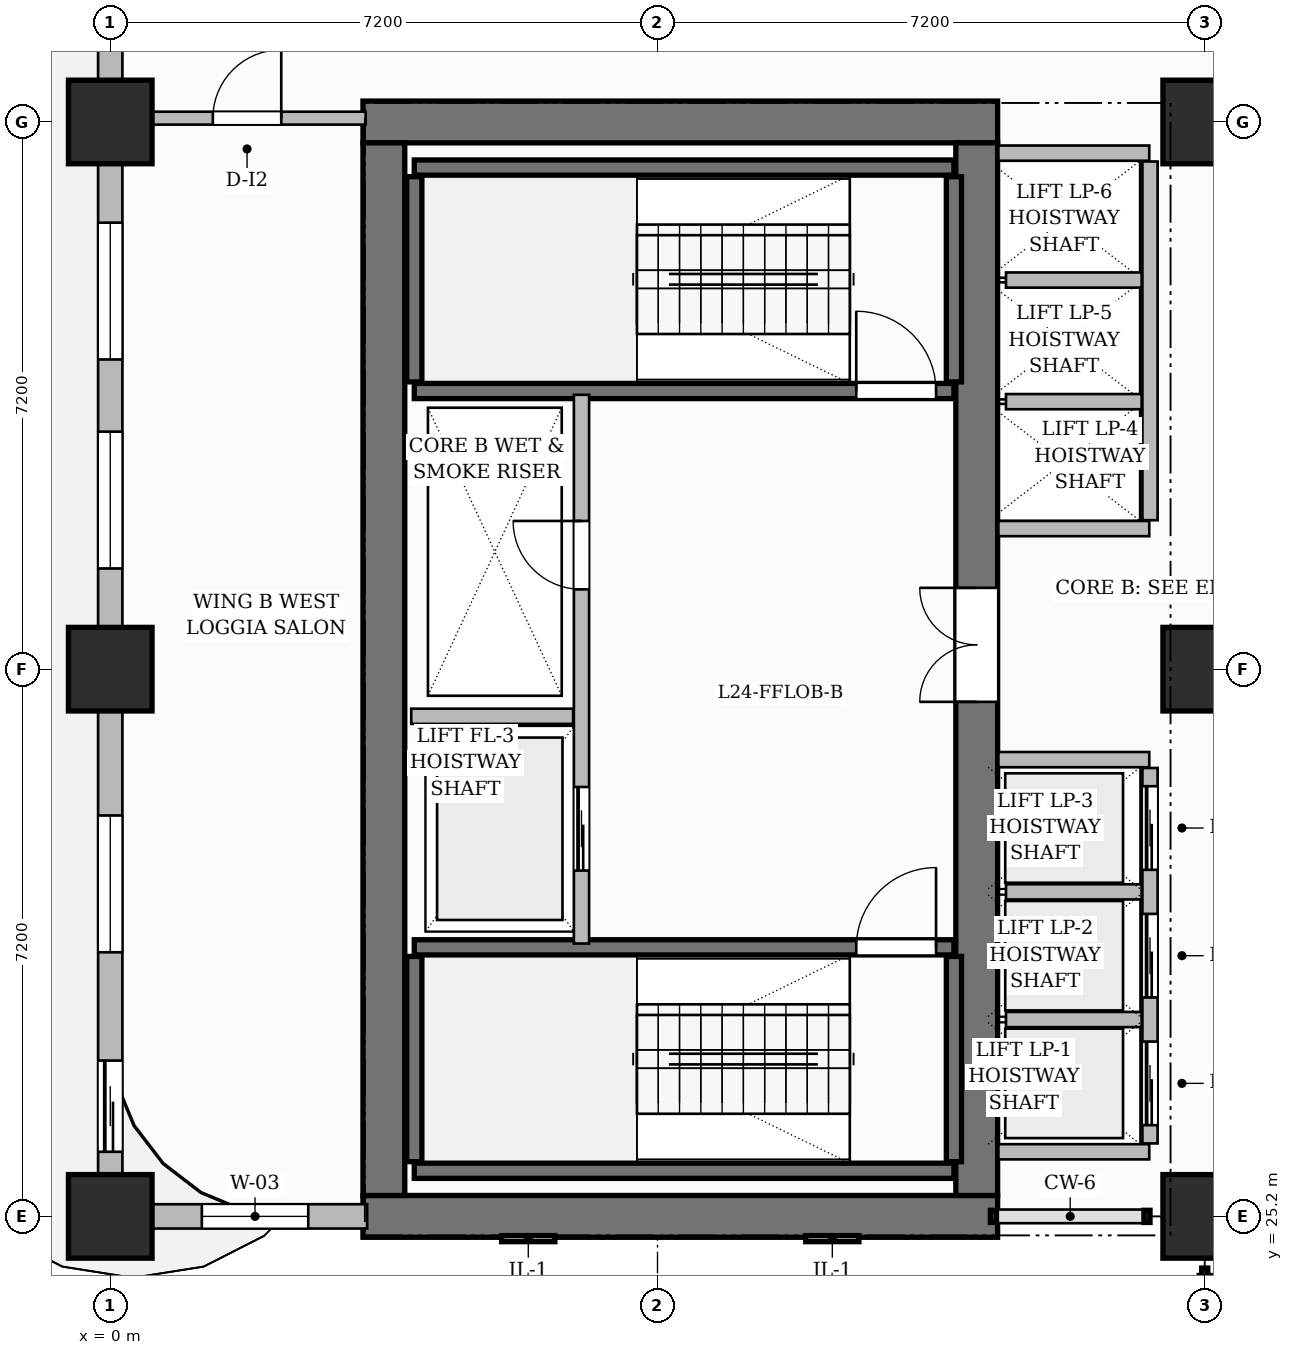
"""IFC4 building model, lengths in metres.
Left out: names, types, materials, properties, quantities, classifications, styles, units other than length and angle.
Written with IfcOpenShell. Run it as: python <this file> out.ifc"""

import sys

from ifc_helpers import new_model, si_unit, direction, frame, frame_2d, origin, origin_2d, place, context, subcontext, project, spatial, rectangle, extrude, source, transform, mapped, element, fill, save


model = new_model("IFC4")
c1 = context("Model", 3, precision=1e-05, world=origin(), true_north=direction((0.0, 1.0)))
c2 = subcontext(c1, "Body", "Model", "MODEL_VIEW")
j1 = project(units=[si_unit("LENGTHUNIT", "METRE"), si_unit("PLANEANGLEUNIT", "RADIAN")], contexts=[c1])
p1 = place(None, origin())
s1 = spatial("IfcSite", under=j1, at=p1, CompositionType="ELEMENT")
p2 = place(p1, origin())
s2 = spatial("IfcBuilding", under=s1, at=p2, CompositionType="ELEMENT")
p3 = place(p2, frame((0.0, 0.0, 99.0)))
s3 = spatial("IfcBuildingStorey", under=s2, at=p3, CompositionType="ELEMENT", Elevation=99.0)
for number, where, z_axis, x_axis in (
    (1, (3.325, 25.2, 0.0), (0.0, 0.0, 1.0), (1.0, 0.0, 0.0)),
    (2, (3.325, 39.6, 0.0), (0.0, 0.0, 1.0), (1.0, 0.0, 0.0)),
):
    element("IfcWall", number, at=place(p3, frame(where, z_axis=z_axis, x_axis=x_axis)), inside=s3, PredefinedType="SHEAR", context=c2, shape_type="SweptSolid", body=[
        extrude(rectangle(XDim=8.35, YDim=0.55, at=frame_2d((4.175, 0.0))), origin(), (0.0, 0.0, 1.0), 3.7),
    ])
p4 = place(p3, frame((3.6, 25.475, 0.0), z_axis=(0.0, 0.0, 1.0), x_axis=(0.0, 1.0, 0.0)))
e3 = element("IfcWall", 3, at=p4, inside=s3, PredefinedType="SHEAR", context=c2, shape_type="SweptSolid", body=[
    extrude(rectangle(XDim=13.85, YDim=0.55, at=frame_2d((6.925, 0.0))), origin(), (0.0, 0.0, 1.0), 3.7),
])
p5 = place(p3, frame((11.4, 25.475, 0.0), z_axis=(0.0, 0.0, 1.0), x_axis=(0.0, 1.0, 0.0)))
e4 = element("IfcWall", 4, at=p5, inside=s3, PredefinedType="SHEAR", context=c2, shape_type="SweptSolid", body=[
    extrude(rectangle(XDim=13.85, YDim=0.55, at=frame_2d((6.925, 0.0))), origin(), (0.0, 0.0, 1.0), 3.7),
])
p6 = place(p5, frame((6.495, 0.0, 0.0)))
e5 = element("IfcOpeningElement", 5, at=p6, cuts=e4, PredefinedType="OPENING", context=c2, shape_type="SweptSolid", body=[
    extrude(rectangle(XDim=1.5, YDim=2.2, at=frame_2d((0.75, 1.1))), frame((0.0, 0.285, 0.0), z_axis=(0.0, -1.0, 0.0), x_axis=(1.0, 0.0, 0.0)), (0.0, 0.0, 1.0), 0.57),
])
m1 = source(origin(), c2, "Body", "SweptSolid", [
    extrude(rectangle(XDim=1.1, YDim=1.1, at=origin_2d()), origin(), (0.0, 0.0, 1.0), 3.7),
])
for number, where, z_axis, x_axis in (
    (6, (0.0, 25.2, 0.0), (0.0, 0.0, 1.0), (1.0, 0.0, 0.0)),
    (7, (0.0, 32.4, 0.0), (0.0, 0.0, 1.0), (1.0, 0.0, 0.0)),
    (8, (0.0, 39.6, 0.0), (0.0, 0.0, 1.0), (1.0, 0.0, 0.0)),
    (9, (14.4, 25.2, 0.0), (0.0, 0.0, 1.0), (1.0, 0.0, 0.0)),
    (10, (14.4, 32.4, 0.0), (0.0, 0.0, 1.0), (1.0, 0.0, 0.0)),
    (11, (14.4, 39.6, 0.0), (0.0, 0.0, 1.0), (1.0, 0.0, 0.0)),
):
    element("IfcColumn", number, at=place(p3, frame(where, z_axis=z_axis, x_axis=x_axis)), inside=s3, PredefinedType="COLUMN", context=c2, shape_type="MappedRepresentation", body=[
        mapped(m1, transform((0.0, 0.0, 0.0), scale=1.0)),
    ])
p7 = place(p3, frame((4.0, 25.8, 0.0), z_axis=(0.0, 0.0, 1.0), x_axis=(1.0, 0.0, 0.0)))
e12 = element("IfcWall", 12, at=p7, inside=s3, PredefinedType="SHEAR", context=c2, shape_type="SweptSolid", body=[
    extrude(rectangle(XDim=7.1, YDim=0.2, at=frame_2d((3.55, 0.0))), origin(), (0.0, 0.0, 1.0), 3.7),
])
for number, where, z_axis, x_axis in (
    (13, (4.0, 25.92, 0.0), (0.0, 0.0, 1.0), (0.0, 1.0, 0.0)),
    (14, (11.1, 25.92, 0.0), (0.0, 0.0, 1.0), (0.0, 1.0, 0.0)),
):
    element("IfcWall", number, at=place(p3, frame(where, z_axis=z_axis, x_axis=x_axis)), inside=s3, PredefinedType="SHEAR", context=c2, shape_type="SweptSolid", body=[
        extrude(rectangle(XDim=2.7, YDim=0.2, at=frame_2d((1.35, 0.0))), origin(), (0.0, 0.0, 1.0), 3.7),
    ])
p8 = place(p3, frame((4.0, 28.74, 0.0), z_axis=(0.0, 0.0, 1.0), x_axis=(1.0, 0.0, 0.0)))
e15 = element("IfcWall", 15, at=p8, inside=s3, PredefinedType="SHEAR", context=c2, shape_type="SweptSolid", body=[
    extrude(rectangle(XDim=7.1, YDim=0.2, at=frame_2d((3.55, 0.0))), origin(), (0.0, 0.0, 1.0), 3.7),
])
p9 = place(p8, frame((5.815, 0.0, 0.0)))
e16 = element("IfcOpeningElement", 16, at=p9, cuts=e15, PredefinedType="OPENING", context=c2, shape_type="SweptSolid", body=[
    extrude(rectangle(XDim=1.05, YDim=2.2, at=frame_2d((0.525, 1.1))), frame((0.0, 0.11, 0.0), z_axis=(0.0, -1.0, 0.0), x_axis=(1.0, 0.0, 0.0)), (0.0, 0.0, 1.0), 0.22),
])
p10 = place(p3, frame((4.0, 39.0, 0.0), z_axis=(0.0, 0.0, 1.0), x_axis=(1.0, 0.0, 0.0)))
e17 = element("IfcWall", 17, at=p10, inside=s3, PredefinedType="SHEAR", context=c2, shape_type="SweptSolid", body=[
    extrude(rectangle(XDim=7.1, YDim=0.2, at=frame_2d((3.55, 0.0))), origin(), (0.0, 0.0, 1.0), 3.7),
])
for number, where, z_axis, x_axis in (
    (18, (4.0, 36.18, 0.0), (0.0, 0.0, 1.0), (0.0, 1.0, 0.0)),
    (19, (11.1, 36.18, 0.0), (0.0, 0.0, 1.0), (0.0, 1.0, 0.0)),
):
    element("IfcWall", number, at=place(p3, frame(where, z_axis=z_axis, x_axis=x_axis)), inside=s3, PredefinedType="SHEAR", context=c2, shape_type="SweptSolid", body=[
        extrude(rectangle(XDim=2.7, YDim=0.2, at=frame_2d((1.35, 0.0))), origin(), (0.0, 0.0, 1.0), 3.7),
    ])
p11 = place(p3, frame((4.0, 36.06, 0.0), z_axis=(0.0, 0.0, 1.0), x_axis=(1.0, 0.0, 0.0)))
e20 = element("IfcWall", 20, at=p11, inside=s3, PredefinedType="SHEAR", context=c2, shape_type="SweptSolid", body=[
    extrude(rectangle(XDim=7.1, YDim=0.2, at=frame_2d((3.55, 0.0))), origin(), (0.0, 0.0, 1.0), 3.7),
])
p12 = place(p11, frame((5.815, 0.0, 0.0)))
e21 = element("IfcOpeningElement", 21, at=p12, cuts=e20, PredefinedType="OPENING", context=c2, shape_type="SweptSolid", body=[
    extrude(rectangle(XDim=1.05, YDim=2.2, at=frame_2d((0.525, 1.1))), frame((0.0, 0.11, 0.0), z_axis=(0.0, -1.0, 0.0), x_axis=(1.0, 0.0, 0.0)), (0.0, 0.0, 1.0), 0.22),
])
p13 = place(p3, frame((6.2, 28.79, 0.0), z_axis=(0.0, 0.0, 1.0), x_axis=(0.0, 1.0, 0.0)))
e22 = element("IfcWall", 22, at=p13, inside=s3, PredefinedType="PARTITIONING", context=c2, shape_type="SweptSolid", body=[
    extrude(rectangle(XDim=7.22, YDim=0.2, at=frame_2d((3.61, 0.0))), origin(), (0.0, 0.0, 1.0), 3.45),
])
p14 = place(p13, frame((4.66, 0.0, 0.0)))
e23 = element("IfcOpeningElement", 23, at=p14, cuts=e22, PredefinedType="OPENING", context=c2, shape_type="SweptSolid", body=[
    extrude(rectangle(XDim=0.9, YDim=2.1, at=frame_2d((0.45, 1.05))), frame((0.0, 0.11, 0.0), z_axis=(0.0, -1.0, 0.0), x_axis=(1.0, 0.0, 0.0)), (0.0, 0.0, 1.0), 0.22),
])
p15 = place(p13, frame((0.96, 0.0, 0.0)))
e24 = element("IfcOpeningElement", 24, at=p15, cuts=e22, PredefinedType="OPENING", context=c2, shape_type="SweptSolid", body=[
    extrude(rectangle(XDim=1.1, YDim=2.2, at=frame_2d((0.55, 1.1))), frame((0.0, 0.11, 0.0), z_axis=(0.0, -1.0, 0.0), x_axis=(1.0, 0.0, 0.0)), (0.0, 0.0, 1.0), 0.22),
])
p16 = place(p3, frame((3.96, 31.78, 0.0), z_axis=(0.0, 0.0, 1.0), x_axis=(1.0, 0.0, 0.0)))
e25 = element("IfcWall", 25, at=p16, inside=s3, PredefinedType="PARTITIONING", context=c2, shape_type="SweptSolid", body=[
    extrude(rectangle(XDim=2.13, YDim=0.2, at=frame_2d((1.065, 0.0))), origin(), (0.0, 0.0, 1.0), 3.45),
])
for number, where, z_axis, x_axis in (
    (26, (11.685, 26.05, 0.0), (0.0, 0.0, 1.0), (1.0, 0.0, 0.0)),
    (27, (11.685, 31.21, 0.0), (0.0, 0.0, 1.0), (1.0, 0.0, 0.0)),
):
    element("IfcWall", number, at=place(p3, frame(where, z_axis=z_axis, x_axis=x_axis)), inside=s3, PredefinedType="PARTITIONING", context=c2, shape_type="SweptSolid", body=[
        extrude(rectangle(XDim=1.985, YDim=0.2, at=frame_2d((0.992, 0.0))), origin(), (0.0, 0.0, 1.0), 3.45),
    ])
p17 = place(p3, frame((13.68, 26.16, 0.0), z_axis=(0.0, 0.0, 1.0), x_axis=(0.0, 1.0, 0.0)))
e28 = element("IfcWall", 28, at=p17, inside=s3, PredefinedType="PARTITIONING", context=c2, shape_type="SweptSolid", body=[
    extrude(rectangle(XDim=4.94, YDim=0.2, at=frame_2d((2.47, 0.0))), origin(), (0.0, 0.0, 1.0), 3.45),
])
p18 = place(p17, frame((0.24, 0.0, 0.0)))
e29 = element("IfcOpeningElement", 29, at=p18, cuts=e28, PredefinedType="OPENING", context=c2, shape_type="SweptSolid", body=[
    extrude(rectangle(XDim=1.1, YDim=2.2, at=frame_2d((0.55, 1.1))), frame((0.0, 0.11, 0.0), z_axis=(0.0, -1.0, 0.0), x_axis=(1.0, 0.0, 0.0)), (0.0, 0.0, 1.0), 0.22),
])
p19 = place(p17, frame((1.92, 0.0, 0.0)))
e30 = element("IfcOpeningElement", 30, at=p19, cuts=e28, PredefinedType="OPENING", context=c2, shape_type="SweptSolid", body=[
    extrude(rectangle(XDim=1.1, YDim=2.2, at=frame_2d((0.55, 1.1))), frame((0.0, 0.11, 0.0), z_axis=(0.0, -1.0, 0.0), x_axis=(1.0, 0.0, 0.0)), (0.0, 0.0, 1.0), 0.22),
])
p20 = place(p17, frame((3.6, 0.0, 0.0)))
e31 = element("IfcOpeningElement", 31, at=p20, cuts=e28, PredefinedType="OPENING", context=c2, shape_type="SweptSolid", body=[
    extrude(rectangle(XDim=1.1, YDim=2.2, at=frame_2d((0.55, 1.1))), frame((0.0, 0.11, 0.0), z_axis=(0.0, -1.0, 0.0), x_axis=(1.0, 0.0, 0.0)), (0.0, 0.0, 1.0), 0.22),
])
for number, where, z_axis, x_axis in (
    (32, (11.785, 27.79, 0.0), (0.0, 0.0, 1.0), (1.0, 0.0, 0.0)),
    (33, (11.785, 29.47, 0.0), (0.0, 0.0, 1.0), (1.0, 0.0, 0.0)),
):
    element("IfcWall", number, at=place(p3, frame(where, z_axis=z_axis, x_axis=x_axis)), inside=s3, PredefinedType="PARTITIONING", context=c2, shape_type="SweptSolid", body=[
        extrude(rectangle(XDim=1.785, YDim=0.2, at=frame_2d((0.893, 0.0))), origin(), (0.0, 0.0, 1.0), 3.45),
    ])
for number, where, z_axis, x_axis in (
    (34, (11.685, 34.25, 0.0), (0.0, 0.0, 1.0), (1.0, 0.0, 0.0)),
    (35, (11.685, 39.19, 0.0), (0.0, 0.0, 1.0), (1.0, 0.0, 0.0)),
):
    element("IfcWall", number, at=place(p3, frame(where, z_axis=z_axis, x_axis=x_axis)), inside=s3, PredefinedType="PARTITIONING", context=c2, shape_type="SweptSolid", body=[
        extrude(rectangle(XDim=1.985, YDim=0.2, at=frame_2d((0.992, 0.0))), origin(), (0.0, 0.0, 1.0), 3.45),
    ])
p21 = place(p3, frame((13.68, 34.36, 0.0), z_axis=(0.0, 0.0, 1.0), x_axis=(0.0, 1.0, 0.0)))
e36 = element("IfcWall", 36, at=p21, inside=s3, PredefinedType="PARTITIONING", context=c2, shape_type="SweptSolid", body=[
    extrude(rectangle(XDim=4.72, YDim=0.2, at=frame_2d((2.36, 0.0))), origin(), (0.0, 0.0, 1.0), 3.45),
])
for number, where, z_axis, x_axis in (
    (37, (11.785, 35.92, 0.0), (0.0, 0.0, 1.0), (1.0, 0.0, 0.0)),
    (38, (11.785, 37.52, 0.0), (0.0, 0.0, 1.0), (1.0, 0.0, 0.0)),
):
    element("IfcWall", number, at=place(p3, frame(where, z_axis=z_axis, x_axis=x_axis)), inside=s3, PredefinedType="PARTITIONING", context=c2, shape_type="SweptSolid", body=[
        extrude(rectangle(XDim=1.785, YDim=0.2, at=frame_2d((0.893, 0.0))), origin(), (0.0, 0.0, 1.0), 3.45),
    ])
p22 = place(p3, frame((0.24, 39.65, 0.0), z_axis=(0.0, 0.0, 1.0), x_axis=(1.0, 0.0, 0.0)))
e39 = element("IfcWall", 39, at=p22, inside=s3, PredefinedType="PARTITIONING", context=c2, shape_type="SweptSolid", body=[
    extrude(rectangle(XDim=3.12, YDim=0.17, at=frame_2d((1.56, 0.0))), origin(), (0.0, 0.0, 1.0), 3.45),
])
p23 = place(p22, frame((1.11, 0.0, 0.0)))
e40 = element("IfcOpeningElement", 40, at=p23, cuts=e39, PredefinedType="OPENING", context=c2, shape_type="SweptSolid", body=[
    extrude(rectangle(XDim=0.9, YDim=2.15, at=frame_2d((0.45, 1.075))), frame((0.0, 0.095, 0.0), z_axis=(0.0, -1.0, 0.0), x_axis=(1.0, 0.0, 0.0)), (0.0, 0.0, 1.0), 0.19),
])
p24 = place(p3, frame((0.0, 25.2, 0.0), z_axis=(0.0, 0.0, 1.0), x_axis=(1.0, 0.0, 0.0)))
e41 = element("IfcWall", 41, at=p24, inside=s3, PredefinedType="SOLIDWALL", context=c2, shape_type="SweptSolid", body=[
    extrude(rectangle(XDim=3.38, YDim=0.32, at=frame_2d((1.69, 0.0))), origin(), (0.0, 0.0, 1.0), 3.45),
])
p25 = place(p24, frame((1.205, 0.0, 0.8)))
e42 = element("IfcOpeningElement", 42, at=p25, cuts=e41, PredefinedType="OPENING", context=c2, shape_type="SweptSolid", body=[
    extrude(rectangle(XDim=1.4, YDim=1.85, at=frame_2d((0.7, 0.925))), frame((0.0, 0.17, 0.0), z_axis=(0.0, -1.0, 0.0), x_axis=(1.0, 0.0, 0.0)), (0.0, 0.0, 1.0), 0.34),
])
p26 = place(p3, frame((0.0, 25.25, 0.0), z_axis=(0.0, 0.0, 1.0), x_axis=(0.0, 1.0, 0.0)))
e43 = element("IfcWall", 43, at=p26, inside=s3, PredefinedType="SOLIDWALL", context=c2, shape_type="SweptSolid", body=[
    extrude(rectangle(XDim=21.5, YDim=0.32, at=frame_2d((10.75, 0.0))), origin(), (0.0, 0.0, 1.0), 2.885),
])
p27 = place(p26, frame((18.45, 0.0, 0.0)))
e44 = element("IfcOpeningElement", 44, at=p27, cuts=e43, PredefinedType="OPENING", context=c2, shape_type="SweptSolid", body=[
    extrude(rectangle(XDim=1.2, YDim=2.2, at=frame_2d((0.6, 1.1))), frame((0.0, 0.17, 0.0), z_axis=(0.0, -1.0, 0.0), x_axis=(1.0, 0.0, 0.0)), (0.0, 0.0, 1.0), 0.34),
])
p28 = place(p26, frame((0.8, 0.0, 0.0)))
e45 = element("IfcOpeningElement", 45, at=p28, cuts=e43, PredefinedType="OPENING", context=c2, shape_type="SweptSolid", body=[
    extrude(rectangle(XDim=1.2, YDim=2.2, at=frame_2d((0.6, 1.1))), frame((0.0, 0.17, 0.0), z_axis=(0.0, -1.0, 0.0), x_axis=(1.0, 0.0, 0.0)), (0.0, 0.0, 1.0), 0.34),
])
p29 = place(p26, frame((3.425, 0.0, 0.8)))
e46 = element("IfcOpeningElement", 46, at=p29, cuts=e43, PredefinedType="OPENING", context=c2, shape_type="SweptSolid", body=[
    extrude(rectangle(XDim=1.8, YDim=1.85, at=frame_2d((0.9, 0.925))), frame((0.0, 0.17, 0.0), z_axis=(0.0, -1.0, 0.0), x_axis=(1.0, 0.0, 0.0)), (0.0, 0.0, 1.0), 0.34),
])
p30 = place(p26, frame((8.475, 0.0, 0.8)))
e47 = element("IfcOpeningElement", 47, at=p30, cuts=e43, PredefinedType="OPENING", context=c2, shape_type="SweptSolid", body=[
    extrude(rectangle(XDim=1.8, YDim=1.85, at=frame_2d((0.9, 0.925))), frame((0.0, 0.17, 0.0), z_axis=(0.0, -1.0, 0.0), x_axis=(1.0, 0.0, 0.0)), (0.0, 0.0, 1.0), 0.34),
])
p31 = place(p26, frame((11.225, 0.0, 0.8)))
e48 = element("IfcOpeningElement", 48, at=p31, cuts=e43, PredefinedType="OPENING", context=c2, shape_type="SweptSolid", body=[
    extrude(rectangle(XDim=1.8, YDim=1.85, at=frame_2d((0.9, 0.925))), frame((0.0, 0.17, 0.0), z_axis=(0.0, -1.0, 0.0), x_axis=(1.0, 0.0, 0.0)), (0.0, 0.0, 1.0), 0.34),
])
p32 = place(p26, frame((15.75, 0.0, 0.8)))
e49 = element("IfcOpeningElement", 49, at=p32, cuts=e43, PredefinedType="OPENING", context=c2, shape_type="SweptSolid", body=[
    extrude(rectangle(XDim=1.8, YDim=1.85, at=frame_2d((0.9, 0.925))), frame((0.0, 0.17, 0.0), z_axis=(0.0, -1.0, 0.0), x_axis=(1.0, 0.0, 0.0)), (0.0, 0.0, 1.0), 0.34),
])
m2 = source(origin(), c2, "Body", "SweptSolid", [
    extrude(rectangle(XDim=1.05, YDim=2.2, at=frame_2d((0.525, 1.1))), frame((0.0, 0.025, 0.0), z_axis=(0.0, -1.0, 0.0), x_axis=(1.0, 0.0, 0.0)), (0.0, 0.0, 1.0), 0.05),
])
p33 = place(p9, origin())
e50 = element("IfcDoor", 50, at=p33, inside=s3, OperationType="SINGLE_SWING_RIGHT", PredefinedType="DOOR", context=c2, shape_type="MappedRepresentation", body=[
    mapped(m2, transform((0.0, 0.0, 0.0), scale=1.0)),
])
fill(e16, e50)
p34 = place(p12, origin())
e51 = element("IfcDoor", 51, at=p34, inside=s3, OperationType="SINGLE_SWING_LEFT", PredefinedType="DOOR", context=c2, shape_type="MappedRepresentation", body=[
    mapped(m2, transform((0.0, 0.0, 0.0), scale=1.0)),
])
fill(e21, e51)
m3 = source(origin(), c2, "Body", "SweptSolid", [
    extrude(rectangle(XDim=0.9, YDim=2.1, at=frame_2d((0.45, 1.05))), frame((0.0, 0.025, 0.0), z_axis=(0.0, -1.0, 0.0), x_axis=(1.0, 0.0, 0.0)), (0.0, 0.0, 1.0), 0.05),
])
p35 = place(p14, origin())
e52 = element("IfcDoor", 52, at=p35, inside=s3, OperationType="SINGLE_SWING_RIGHT", PredefinedType="DOOR", context=c2, shape_type="MappedRepresentation", body=[
    mapped(m3, transform((0.0, 0.0, 0.0), scale=1.0)),
])
fill(e23, e52)
m4 = source(origin(), c2, "Body", "SweptSolid", [
    extrude(rectangle(XDim=1.5, YDim=2.2, at=frame_2d((0.75, 1.1))), frame((0.0, 0.025, 0.0), z_axis=(0.0, -1.0, 0.0), x_axis=(1.0, 0.0, 0.0)), (0.0, 0.0, 1.0), 0.05),
])
p36 = place(p6, origin())
e53 = element("IfcDoor", 53, at=p36, inside=s3, OperationType="DOUBLE_DOOR_SINGLE_SWING", PredefinedType="DOOR", context=c2, shape_type="MappedRepresentation", body=[
    mapped(m4, transform((0.0, 0.0, 0.0), scale=1.0)),
])
fill(e5, e53)
m5 = source(origin(), c2, "Body", "SweptSolid", [
    extrude(rectangle(XDim=0.9, YDim=2.15, at=frame_2d((0.45, 1.075))), frame((0.0, 0.025, 0.0), z_axis=(0.0, -1.0, 0.0), x_axis=(1.0, 0.0, 0.0)), (0.0, 0.0, 1.0), 0.05),
])
p37 = place(p23, origin())
e54 = element("IfcDoor", 54, at=p37, inside=s3, OperationType="SINGLE_SWING_RIGHT", PredefinedType="DOOR", context=c2, shape_type="MappedRepresentation", body=[
    mapped(m5, transform((0.0, 0.0, 0.0), scale=1.0)),
])
fill(e40, e54)
m6 = source(origin(), c2, "Body", "SweptSolid", [
    extrude(rectangle(XDim=1.1, YDim=2.2, at=frame_2d((0.55, 1.1))), frame((0.0, 0.025, 0.0), z_axis=(0.0, -1.0, 0.0), x_axis=(1.0, 0.0, 0.0)), (0.0, 0.0, 1.0), 0.05),
])
p38 = place(p15, origin())
e55 = element("IfcDoor", 55, at=p38, inside=s3, OperationType="SLIDING_TO_LEFT", PredefinedType="DOOR", context=c2, shape_type="MappedRepresentation", body=[
    mapped(m6, transform((0.0, 0.0, 0.0), scale=1.0)),
])
fill(e24, e55)
p39 = place(p18, origin())
e56 = element("IfcDoor", 56, at=p39, inside=s3, OperationType="SLIDING_TO_LEFT", PredefinedType="DOOR", context=c2, shape_type="MappedRepresentation", body=[
    mapped(m6, transform((0.0, 0.0, 0.0), scale=1.0)),
])
fill(e29, e56)
p40 = place(p19, origin())
e57 = element("IfcDoor", 57, at=p40, inside=s3, OperationType="SLIDING_TO_LEFT", PredefinedType="DOOR", context=c2, shape_type="MappedRepresentation", body=[
    mapped(m6, transform((0.0, 0.0, 0.0), scale=1.0)),
])
fill(e30, e57)
p41 = place(p20, origin())
e58 = element("IfcDoor", 58, at=p41, inside=s3, OperationType="SLIDING_TO_LEFT", PredefinedType="DOOR", context=c2, shape_type="MappedRepresentation", body=[
    mapped(m6, transform((0.0, 0.0, 0.0), scale=1.0)),
])
fill(e31, e58)
m7 = source(origin(), c2, "Body", "SweptSolid", [
    extrude(rectangle(XDim=1.2, YDim=2.2, at=frame_2d((0.6, 1.1))), frame((0.0, 0.025, 0.0), z_axis=(0.0, -1.0, 0.0), x_axis=(1.0, 0.0, 0.0)), (0.0, 0.0, 1.0), 0.05),
])
p42 = place(p28, origin())
e59 = element("IfcDoor", 59, at=p42, inside=s3, OperationType="SLIDING_TO_LEFT", PredefinedType="DOOR", context=c2, shape_type="MappedRepresentation", body=[
    mapped(m7, transform((0.0, 0.0, 0.0), scale=1.0)),
])
fill(e45, e59)
m8 = source(origin(), c2, "Body", "SweptSolid", [
    extrude(rectangle(XDim=1.4, YDim=1.85, at=frame_2d((0.7, 0.925))), frame((0.0, 0.03, 0.0), z_axis=(0.0, -1.0, 0.0), x_axis=(1.0, 0.0, 0.0)), (0.0, 0.0, 1.0), 0.06),
])
p43 = place(p25, origin())
e60 = element("IfcWindow", 60, at=p43, inside=s3, PartitioningType="SINGLE_PANEL", PredefinedType="WINDOW", context=c2, shape_type="MappedRepresentation", body=[
    mapped(m8, transform((0.0, 0.0, 0.0), scale=1.0)),
])
fill(e42, e60)
m9 = source(origin(), c2, "Body", "SweptSolid", [
    extrude(rectangle(XDim=1.8, YDim=1.85, at=frame_2d((0.9, 0.925))), frame((0.0, 0.03, 0.0), z_axis=(0.0, -1.0, 0.0), x_axis=(1.0, 0.0, 0.0)), (0.0, 0.0, 1.0), 0.06),
])
p44 = place(p29, origin())
e61 = element("IfcWindow", 61, at=p44, inside=s3, PartitioningType="DOUBLE_PANEL_VERTICAL", PredefinedType="WINDOW", context=c2, shape_type="MappedRepresentation", body=[
    mapped(m9, transform((0.0, 0.0, 0.0), scale=1.0)),
])
fill(e46, e61)
p45 = place(p30, origin())
e62 = element("IfcWindow", 62, at=p45, inside=s3, PartitioningType="DOUBLE_PANEL_VERTICAL", PredefinedType="WINDOW", context=c2, shape_type="MappedRepresentation", body=[
    mapped(m9, transform((0.0, 0.0, 0.0), scale=1.0)),
])
fill(e47, e62)
p46 = place(p31, origin())
e63 = element("IfcWindow", 63, at=p46, inside=s3, PartitioningType="DOUBLE_PANEL_VERTICAL", PredefinedType="WINDOW", context=c2, shape_type="MappedRepresentation", body=[
    mapped(m9, transform((0.0, 0.0, 0.0), scale=1.0)),
])
fill(e48, e63)
save(model, sys.argv[1])
